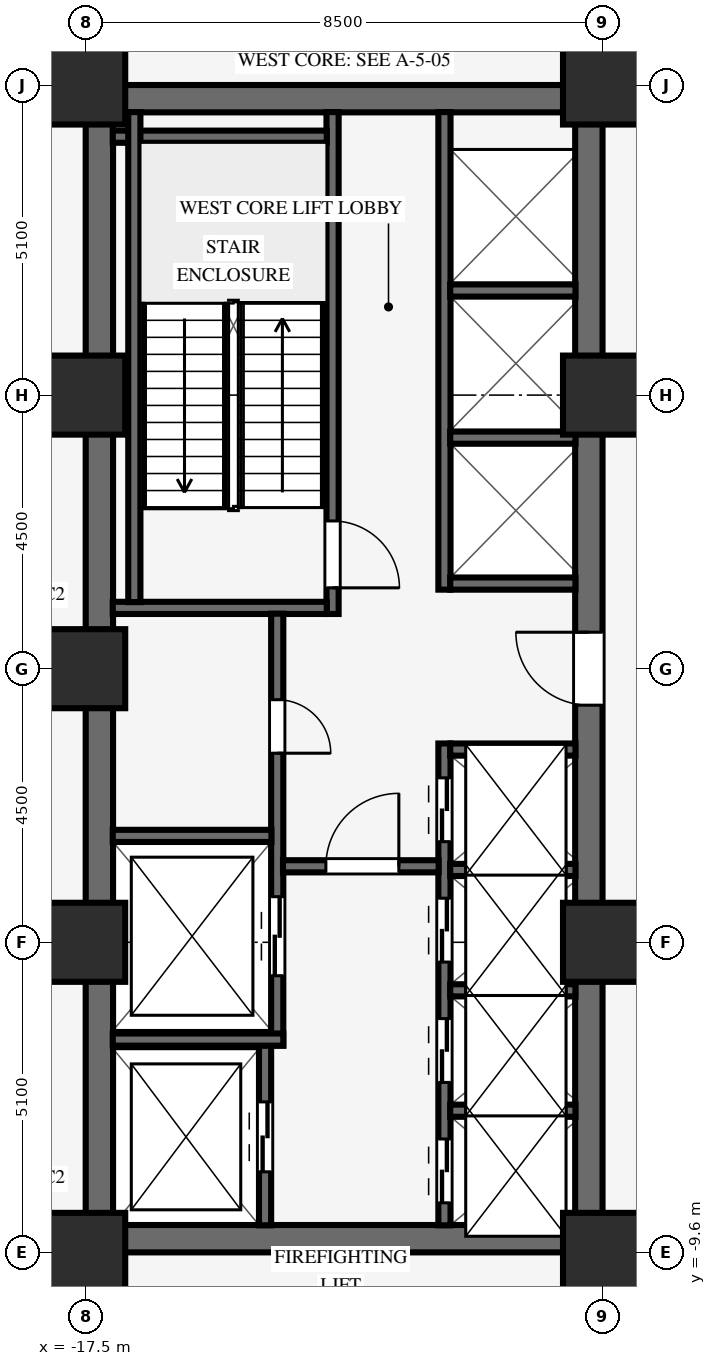
"""IFC4 building model, lengths in metres.
Left out: names, types, materials, properties, quantities, classifications, styles, units other than length and angle.
Written with IfcOpenShell. Run it as: python <this file> out.ifc"""

import sys

from ifc_helpers import new_model, si_unit, direction, frame, frame_2d, origin, origin_2d, place, context, subcontext, project, spatial, rectangle, extrude, source, transform, mapped, element, fill, save


model = new_model("IFC4")
c1 = context("Model", 3, precision=1e-05, world=origin(), true_north=direction((0.0, 1.0)))
c2 = subcontext(c1, "Body", "Model", "MODEL_VIEW")
j1 = project(units=[si_unit("LENGTHUNIT", "METRE"), si_unit("PLANEANGLEUNIT", "RADIAN")], contexts=[c1])
p1 = place(None, origin())
s1 = spatial("IfcSite", under=j1, at=p1, CompositionType="ELEMENT")
p2 = place(p1, origin())
s2 = spatial("IfcBuilding", under=s1, at=p2, CompositionType="ELEMENT")
p3 = place(p2, frame((0.0, 0.0, 23.0)))
s3 = spatial("IfcBuildingStorey", under=s2, at=p3, CompositionType="ELEMENT", Elevation=23.0)
for number, where, z_axis, x_axis in (
    (1, (-17.5, -9.375, 0.0), (0.0, 0.0, 1.0), (1.0, 0.0, 0.0)),
    (2, (-17.5, 9.375, 0.0), (0.0, 0.0, 1.0), (1.0, 0.0, 0.0)),
):
    element("IfcWall", number, at=place(p3, frame(where, z_axis=z_axis, x_axis=x_axis)), inside=s3, PredefinedType="SHEAR", context=c2, shape_type="SweptSolid", body=[
        extrude(rectangle(XDim=8.5, YDim=0.45, at=frame_2d((4.25, 0.0))), origin(), (0.0, 0.0, 1.0), 4.2),
    ])
p4 = place(p3, frame((-17.275, -9.155, 0.0), z_axis=(0.0, 0.0, 1.0), x_axis=(0.0, 1.0, 0.0)))
e3 = element("IfcWall", 3, at=p4, inside=s3, PredefinedType="SHEAR", context=c2, shape_type="SweptSolid", body=[
    extrude(rectangle(XDim=18.31, YDim=0.45, at=frame_2d((9.155, 0.0))), origin(), (0.0, 0.0, 1.0), 4.2),
])
p5 = place(p3, frame((-9.225, -9.155, 0.0), z_axis=(0.0, 0.0, 1.0), x_axis=(0.0, 1.0, 0.0)))
e4 = element("IfcWall", 4, at=p5, inside=s3, PredefinedType="SHEAR", context=c2, shape_type="SweptSolid", body=[
    extrude(rectangle(XDim=18.31, YDim=0.45, at=frame_2d((9.155, 0.0))), origin(), (0.0, 0.0, 1.0), 4.2),
])
p6 = place(p5, frame((8.555, 0.0, 0.0)))
e5 = element("IfcOpeningElement", 5, at=p6, cuts=e4, PredefinedType="OPENING", context=c2, shape_type="SweptSolid", body=[
    extrude(rectangle(XDim=1.2, YDim=2.15, at=frame_2d((0.6, 1.075))), frame((0.0, 0.235, 0.0), z_axis=(0.0, -1.0, 0.0), x_axis=(1.0, 0.0, 0.0)), (0.0, 0.0, 1.0), 0.47),
])
for number, where, z_axis, x_axis in (
    (6, (-17.5, -9.6, 0.0), (0.0, 0.0, 1.0), (1.0, 0.0, 0.0)),
    (7, (-17.5, -4.5, 0.0), (0.0, 0.0, 1.0), (1.0, 0.0, 0.0)),
    (8, (-17.5, 4.5, 0.0), (0.0, 0.0, 1.0), (1.0, 0.0, 0.0)),
    (9, (-17.5, 9.6, 0.0), (0.0, 0.0, 1.0), (1.0, 0.0, 0.0)),
    (10, (-9.0, -9.6, 0.0), (0.0, 0.0, 1.0), (1.0, 0.0, 0.0)),
    (11, (-9.0, -4.5, 0.0), (0.0, 0.0, 1.0), (1.0, 0.0, 0.0)),
    (12, (-9.0, 4.5, 0.0), (0.0, 0.0, 1.0), (1.0, 0.0, 0.0)),
    (13, (-9.0, 9.6, 0.0), (0.0, 0.0, 1.0), (1.0, 0.0, 0.0)),
    (14, (-17.5, 0.0, 0.0), (0.0, 0.0, 1.0), (1.0, 0.0, 0.0)),
):
    element("IfcColumn", number, at=place(p3, frame(where, z_axis=z_axis, x_axis=x_axis)), inside=s3, PredefinedType="COLUMN", context=c2, shape_type="SweptSolid", body=[
        extrude(rectangle(XDim=1.3, YDim=1.3, at=origin_2d()), origin(), (0.0, 0.0, 1.0), 4.2),
    ])
p7 = place(p3, frame((-13.44, 0.9, 0.0), z_axis=(0.0, 0.0, 1.0), x_axis=(0.0, 1.0, 0.0)))
e15 = element("IfcWall", 15, at=p7, inside=s3, PredefinedType="SHEAR", context=c2, shape_type="SweptSolid", body=[
    extrude(rectangle(XDim=8.255, YDim=0.2, at=frame_2d((4.127, 0.0))), origin(), (0.0, 0.0, 1.0), 4.2),
])
p8 = place(p7, frame((1.53, 0.0, 0.0), z_axis=(0.0, 0.0, 1.0), x_axis=(-1.0, 0.0, 0.0)))
e16 = element("IfcOpeningElement", 16, at=p8, cuts=e15, PredefinedType="OPENING", context=c2, shape_type="SweptSolid", body=[
    extrude(rectangle(XDim=1.1, YDim=2.15, at=frame_2d((0.55, 1.075))), frame((0.0, 0.11, 0.0), z_axis=(0.0, -1.0, 0.0), x_axis=(1.0, 0.0, 0.0)), (0.0, 0.0, 1.0), 0.22),
])
for number, where, z_axis, x_axis in (
    (17, (-17.055, 1.0, 0.0), (0.0, 0.0, 1.0), (1.0, 0.0, 0.0)),
    (18, (-17.055, 8.75, 0.0), (0.0, 0.0, 1.0), (1.0, 0.0, 0.0)),
):
    element("IfcWall", number, at=place(p3, frame(where, z_axis=z_axis, x_axis=x_axis)), inside=s3, PredefinedType="SHEAR", context=c2, shape_type="SweptSolid", body=[
        extrude(rectangle(XDim=3.52, YDim=0.2, at=frame_2d((1.76, 0.0))), origin(), (0.0, 0.0, 1.0), 4.2),
    ])
p9 = place(p3, frame((-16.7, 1.095, 0.0), z_axis=(0.0, 0.0, 1.0), x_axis=(0.0, 1.0, 0.0)))
e19 = element("IfcWall", 19, at=p9, inside=s3, PredefinedType="SHEAR", context=c2, shape_type="SweptSolid", body=[
    extrude(rectangle(XDim=8.06, YDim=0.2, at=frame_2d((4.03, 0.0))), origin(), (0.0, 0.0, 1.0), 4.2),
])
p10 = place(p3, frame((-14.55, -9.155, 0.0), z_axis=(0.0, 0.0, 1.0), x_axis=(0.0, 1.0, 0.0)))
e20 = element("IfcWall", 20, at=p10, inside=s3, PredefinedType="SHEAR", context=c2, shape_type="SweptSolid", body=[
    extrude(rectangle(XDim=2.96, YDim=0.2, at=frame_2d((1.48, 0.0))), origin(), (0.0, 0.0, 1.0), 4.2),
])
p11 = place(p10, frame((0.88, 0.0, 0.0)))
e21 = element("IfcOpeningElement", 21, at=p11, cuts=e20, PredefinedType="OPENING", context=c2, shape_type="SweptSolid", body=[
    extrude(rectangle(XDim=1.15, YDim=2.15, at=frame_2d((0.575, 1.075))), frame((0.0, 0.11, 0.0), z_axis=(0.0, -1.0, 0.0), x_axis=(1.0, 0.0, 0.0)), (0.0, 0.0, 1.0), 0.22),
])
p12 = place(p3, frame((-14.35, -6.2, 0.0), z_axis=(0.0, 0.0, 1.0), x_axis=(0.0, 1.0, 0.0)))
e22 = element("IfcWall", 22, at=p12, inside=s3, PredefinedType="SHEAR", context=c2, shape_type="SweptSolid", body=[
    extrude(rectangle(XDim=7.105, YDim=0.2, at=frame_2d((3.552, 0.0))), origin(), (0.0, 0.0, 1.0), 4.2),
])
p13 = place(p12, frame((5.69, 0.0, 0.0), z_axis=(0.0, 0.0, 1.0), x_axis=(-1.0, 0.0, 0.0)))
e23 = element("IfcOpeningElement", 23, at=p13, cuts=e22, PredefinedType="OPENING", context=c2, shape_type="SweptSolid", body=[
    extrude(rectangle(XDim=0.88, YDim=2.1, at=frame_2d((0.44, 1.05))), frame((0.0, 0.11, 0.0), z_axis=(0.0, -1.0, 0.0), x_axis=(1.0, 0.0, 0.0)), (0.0, 0.0, 1.0), 0.22),
])
p14 = place(p12, frame((1.15, 0.0, 0.0)))
e24 = element("IfcOpeningElement", 24, at=p14, cuts=e22, PredefinedType="OPENING", context=c2, shape_type="SweptSolid", body=[
    extrude(rectangle(XDim=1.3, YDim=2.2, at=frame_2d((0.65, 1.1))), frame((0.0, 0.11, 0.0), z_axis=(0.0, -1.0, 0.0), x_axis=(1.0, 0.0, 0.0)), (0.0, 0.0, 1.0), 0.22),
])
p15 = place(p3, frame((-17.055, -6.1, 0.0), z_axis=(0.0, 0.0, 1.0), x_axis=(1.0, 0.0, 0.0)))
e25 = element("IfcWall", 25, at=p15, inside=s3, PredefinedType="SHEAR", context=c2, shape_type="SweptSolid", body=[
    extrude(rectangle(XDim=2.805, YDim=0.2, at=frame_2d((1.402, 0.0))), origin(), (0.0, 0.0, 1.0), 4.2),
])
p16 = place(p3, frame((-17.055, -2.75, 0.0), z_axis=(0.0, 0.0, 1.0), x_axis=(1.0, 0.0, 0.0)))
e26 = element("IfcWall", 26, at=p16, inside=s3, PredefinedType="SHEAR", context=c2, shape_type="SweptSolid", body=[
    extrude(rectangle(XDim=2.61, YDim=0.2, at=frame_2d((1.305, 0.0))), origin(), (0.0, 0.0, 1.0), 4.2),
])
p17 = place(p3, frame((-11.6, -9.155, 0.0), z_axis=(0.0, 0.0, 1.0), x_axis=(0.0, 1.0, 0.0)))
e27 = element("IfcWall", 27, at=p17, inside=s3, PredefinedType="SHEAR", context=c2, shape_type="SweptSolid", body=[
    extrude(rectangle(XDim=7.925, YDim=0.2, at=frame_2d((3.962, 0.0))), origin(), (0.0, 0.0, 1.0), 4.2),
])
p18 = place(p17, frame((0.37, 0.0, 0.0)))
e28 = element("IfcOpeningElement", 28, at=p18, cuts=e27, PredefinedType="OPENING", context=c2, shape_type="SweptSolid", body=[
    extrude(rectangle(XDim=1.05, YDim=2.15, at=frame_2d((0.525, 1.075))), frame((0.0, 0.11, 0.0), z_axis=(0.0, -1.0, 0.0), x_axis=(1.0, 0.0, 0.0)), (0.0, 0.0, 1.0), 0.22),
])
p19 = place(p17, frame((2.35, 0.0, 0.0)))
e29 = element("IfcOpeningElement", 29, at=p19, cuts=e27, PredefinedType="OPENING", context=c2, shape_type="SweptSolid", body=[
    extrude(rectangle(XDim=1.05, YDim=2.15, at=frame_2d((0.525, 1.075))), frame((0.0, 0.11, 0.0), z_axis=(0.0, -1.0, 0.0), x_axis=(1.0, 0.0, 0.0)), (0.0, 0.0, 1.0), 0.22),
])
p20 = place(p17, frame((4.33, 0.0, 0.0)))
e30 = element("IfcOpeningElement", 30, at=p20, cuts=e27, PredefinedType="OPENING", context=c2, shape_type="SweptSolid", body=[
    extrude(rectangle(XDim=1.05, YDim=2.15, at=frame_2d((0.525, 1.075))), frame((0.0, 0.11, 0.0), z_axis=(0.0, -1.0, 0.0), x_axis=(1.0, 0.0, 0.0)), (0.0, 0.0, 1.0), 0.22),
])
p21 = place(p17, frame((6.31, 0.0, 0.0)))
e31 = element("IfcOpeningElement", 31, at=p21, cuts=e27, PredefinedType="OPENING", context=c2, shape_type="SweptSolid", body=[
    extrude(rectangle(XDim=1.05, YDim=2.15, at=frame_2d((0.525, 1.075))), frame((0.0, 0.11, 0.0), z_axis=(0.0, -1.0, 0.0), x_axis=(1.0, 0.0, 0.0)), (0.0, 0.0, 1.0), 0.22),
])
p22 = place(p3, frame((-14.255, -3.25, 0.0), z_axis=(0.0, 0.0, 1.0), x_axis=(1.0, 0.0, 0.0)))
e32 = element("IfcWall", 32, at=p22, inside=s3, PredefinedType="SHEAR", context=c2, shape_type="SweptSolid", body=[
    extrude(rectangle(XDim=2.56, YDim=0.2, at=frame_2d((1.28, 0.0))), origin(), (0.0, 0.0, 1.0), 4.2),
])
p23 = place(p22, frame((0.705, 0.0, 0.0)))
e33 = element("IfcOpeningElement", 33, at=p23, cuts=e32, PredefinedType="OPENING", context=c2, shape_type="SweptSolid", body=[
    extrude(rectangle(XDim=1.2, YDim=2.15, at=frame_2d((0.6, 1.075))), frame((0.0, 0.11, 0.0), z_axis=(0.0, -1.0, 0.0), x_axis=(1.0, 0.0, 0.0)), (0.0, 0.0, 1.0), 0.22),
])
for number, where, z_axis, x_axis in (
    (34, (-11.505, -7.27, 0.0), (0.0, 0.0, 1.0), (1.0, 0.0, 0.0)),
    (35, (-11.505, -5.29, 0.0), (0.0, 0.0, 1.0), (1.0, 0.0, 0.0)),
    (36, (-11.505, -3.31, 0.0), (0.0, 0.0, 1.0), (1.0, 0.0, 0.0)),
    (37, (-11.505, -1.33, 0.0), (0.0, 0.0, 1.0), (1.0, 0.0, 0.0)),
):
    element("IfcWall", number, at=place(p3, frame(where, z_axis=z_axis, x_axis=x_axis)), inside=s3, PredefinedType="SHEAR", context=c2, shape_type="SweptSolid", body=[
        extrude(rectangle(XDim=2.06, YDim=0.2, at=frame_2d((1.03, 0.0))), origin(), (0.0, 0.0, 1.0), 4.2),
    ])
p24 = place(p3, frame((-11.6, 1.3, 0.0), z_axis=(0.0, 0.0, 1.0), x_axis=(0.0, 1.0, 0.0)))
e38 = element("IfcWall", 38, at=p24, inside=s3, PredefinedType="SHEAR", context=c2, shape_type="SweptSolid", body=[
    extrude(rectangle(XDim=7.855, YDim=0.2, at=frame_2d((3.927, 0.0))), origin(), (0.0, 0.0, 1.0), 4.2),
])
for number, where, z_axis, x_axis in (
    (39, (-11.505, 1.4, 0.0), (0.0, 0.0, 1.0), (1.0, 0.0, 0.0)),
    (40, (-11.505, 3.8, 0.0), (0.0, 0.0, 1.0), (1.0, 0.0, 0.0)),
    (41, (-11.505, 6.22, 0.0), (0.0, 0.0, 1.0), (1.0, 0.0, 0.0)),
):
    element("IfcWall", number, at=place(p3, frame(where, z_axis=z_axis, x_axis=x_axis)), inside=s3, PredefinedType="SHEAR", context=c2, shape_type="SweptSolid", body=[
        extrude(rectangle(XDim=2.06, YDim=0.2, at=frame_2d((1.03, 0.0))), origin(), (0.0, 0.0, 1.0), 4.2),
    ])
m1 = source(origin(), c2, "Body", "SweptSolid", [
    extrude(rectangle(XDim=1.1, YDim=2.15, at=frame_2d((0.55, 1.075))), frame((0.0, 0.025, 0.0), z_axis=(0.0, -1.0, 0.0), x_axis=(1.0, 0.0, 0.0)), (0.0, 0.0, 1.0), 0.05),
])
p25 = place(p8, origin())
e42 = element("IfcDoor", 42, at=p25, inside=s3, OperationType="SINGLE_SWING_RIGHT", PredefinedType="DOOR", context=c2, shape_type="MappedRepresentation", body=[
    mapped(m1, transform((0.0, 0.0, 0.0), scale=1.0)),
])
fill(e16, e42)
m2 = source(origin(), c2, "Body", "SweptSolid", [
    extrude(rectangle(XDim=0.88, YDim=2.1, at=frame_2d((0.44, 1.05))), frame((0.0, 0.025, 0.0), z_axis=(0.0, -1.0, 0.0), x_axis=(1.0, 0.0, 0.0)), (0.0, 0.0, 1.0), 0.05),
])
p26 = place(p13, origin())
e43 = element("IfcDoor", 43, at=p26, inside=s3, OperationType="SINGLE_SWING_RIGHT", PredefinedType="DOOR", context=c2, shape_type="MappedRepresentation", body=[
    mapped(m2, transform((0.0, 0.0, 0.0), scale=1.0)),
])
fill(e23, e43)
m3 = source(origin(), c2, "Body", "SweptSolid", [
    extrude(rectangle(XDim=1.2, YDim=2.15, at=frame_2d((0.6, 1.075))), frame((0.0, 0.025, 0.0), z_axis=(0.0, -1.0, 0.0), x_axis=(1.0, 0.0, 0.0)), (0.0, 0.0, 1.0), 0.05),
])
p27 = place(p23, origin())
e44 = element("IfcDoor", 44, at=p27, inside=s3, OperationType="SINGLE_SWING_RIGHT", PredefinedType="DOOR", context=c2, shape_type="MappedRepresentation", body=[
    mapped(m3, transform((0.0, 0.0, 0.0), scale=1.0)),
])
fill(e33, e44)
p28 = place(p6, origin())
e45 = element("IfcDoor", 45, at=p28, inside=s3, OperationType="SINGLE_SWING_RIGHT", PredefinedType="DOOR", context=c2, shape_type="MappedRepresentation", body=[
    mapped(m3, transform((0.0, 0.0, 0.0), scale=1.0)),
])
fill(e5, e45)
m4 = source(origin(), c2, "Body", "SweptSolid", [
    extrude(rectangle(XDim=1.15, YDim=2.15, at=frame_2d((0.575, 1.075))), frame((0.0, 0.025, 0.0), z_axis=(0.0, -1.0, 0.0), x_axis=(1.0, 0.0, 0.0)), (0.0, 0.0, 1.0), 0.05),
])
p29 = place(p11, origin())
e46 = element("IfcDoor", 46, at=p29, inside=s3, OperationType="DOUBLE_DOOR_SLIDING", PredefinedType="DOOR", context=c2, shape_type="MappedRepresentation", body=[
    mapped(m4, transform((0.0, 0.0, 0.0), scale=1.0)),
])
fill(e21, e46)
m5 = source(origin(), c2, "Body", "SweptSolid", [
    extrude(rectangle(XDim=1.3, YDim=2.2, at=frame_2d((0.65, 1.1))), frame((0.0, 0.025, 0.0), z_axis=(0.0, -1.0, 0.0), x_axis=(1.0, 0.0, 0.0)), (0.0, 0.0, 1.0), 0.05),
])
p30 = place(p14, origin())
e47 = element("IfcDoor", 47, at=p30, inside=s3, OperationType="DOUBLE_DOOR_SLIDING", PredefinedType="DOOR", context=c2, shape_type="MappedRepresentation", body=[
    mapped(m5, transform((0.0, 0.0, 0.0), scale=1.0)),
])
fill(e24, e47)
m6 = source(origin(), c2, "Body", "SweptSolid", [
    extrude(rectangle(XDim=1.05, YDim=2.15, at=frame_2d((0.525, 1.075))), frame((0.0, 0.025, 0.0), z_axis=(0.0, -1.0, 0.0), x_axis=(1.0, 0.0, 0.0)), (0.0, 0.0, 1.0), 0.05),
])
p31 = place(p18, origin())
e48 = element("IfcDoor", 48, at=p31, inside=s3, OperationType="DOUBLE_DOOR_SLIDING", PredefinedType="DOOR", context=c2, shape_type="MappedRepresentation", body=[
    mapped(m6, transform((0.0, 0.0, 0.0), scale=1.0)),
])
fill(e28, e48)
p32 = place(p19, origin())
e49 = element("IfcDoor", 49, at=p32, inside=s3, OperationType="DOUBLE_DOOR_SLIDING", PredefinedType="DOOR", context=c2, shape_type="MappedRepresentation", body=[
    mapped(m6, transform((0.0, 0.0, 0.0), scale=1.0)),
])
fill(e29, e49)
p33 = place(p20, origin())
e50 = element("IfcDoor", 50, at=p33, inside=s3, OperationType="DOUBLE_DOOR_SLIDING", PredefinedType="DOOR", context=c2, shape_type="MappedRepresentation", body=[
    mapped(m6, transform((0.0, 0.0, 0.0), scale=1.0)),
])
fill(e30, e50)
p34 = place(p21, origin())
e51 = element("IfcDoor", 51, at=p34, inside=s3, OperationType="DOUBLE_DOOR_SLIDING", PredefinedType="DOOR", context=c2, shape_type="MappedRepresentation", body=[
    mapped(m6, transform((0.0, 0.0, 0.0), scale=1.0)),
])
fill(e31, e51)
save(model, sys.argv[1])
